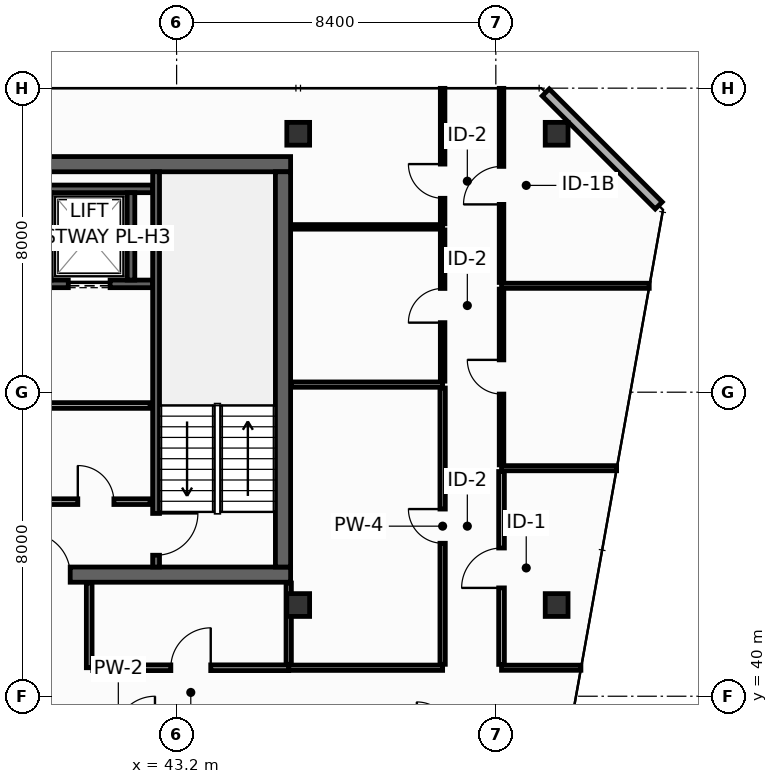
"""IFC4 building model, lengths in metres.
Left out: names, types, materials, properties, quantities, classifications, styles, units other than length and angle.
Written with IfcOpenShell. Run it as: python <this file> out.ifc"""

import sys

from ifc_helpers import new_model, si_unit, direction, frame, frame_2d, origin, origin_2d, place, context, subcontext, project, spatial, rectangle, hollow_rectangle, extrude, element, fill, save


model = new_model("IFC4")
c1 = context("Model", 3, precision=1e-05, world=origin(), true_north=direction((0.0, 1.0)))
c2 = subcontext(c1, "Body", "Model", "MODEL_VIEW")
j1 = project(units=[si_unit("LENGTHUNIT", "METRE"), si_unit("PLANEANGLEUNIT", "RADIAN")], contexts=[c1])
p1 = place(None, origin())
s1 = spatial("IfcSite", under=j1, at=p1, CompositionType="ELEMENT")
p2 = place(p1, origin())
s2 = spatial("IfcBuilding", under=s1, at=p2, CompositionType="ELEMENT")
p3 = place(p2, frame((0.0, 0.0, 264.8)))
s3 = spatial("IfcBuildingStorey", under=s2, at=p3, CompositionType="ELEMENT", Elevation=264.8)
p4 = place(p3, frame((13.7, 43.2, 0.0), z_axis=(0.0, 0.0, 1.0), x_axis=(1.0, 0.0, 0.0)))
e1 = element("IfcWall", 1, at=p4, inside=s3, PredefinedType="SHEAR", context=c2, shape_type="SweptSolid", body=[
    extrude(rectangle(XDim=32.5, YDim=0.4, at=frame_2d((16.25, 0.0))), origin(), (0.0, 0.0, 1.0), 3.55),
])
p5 = place(p4, frame((5.4, 0.0, 0.0)))
e2 = element("IfcOpeningElement", 2, at=p5, cuts=e1, PredefinedType="OPENING", context=c2, shape_type="SweptSolid", body=[
    extrude(rectangle(XDim=1.1, YDim=2.15, at=frame_2d((0.55, 1.075))), frame((0.0, 0.21, 0.0), z_axis=(0.0, -1.0, 0.0), x_axis=(1.0, 0.0, 0.0)), (0.0, 0.0, 1.0), 0.42),
])
p6 = place(p4, frame((25.6, 0.0, 0.0)))
e3 = element("IfcOpeningElement", 3, at=p6, cuts=e1, PredefinedType="OPENING", context=c2, shape_type="SweptSolid", body=[
    extrude(rectangle(XDim=1.1, YDim=2.15, at=frame_2d((0.55, 1.075))), frame((0.0, 0.21, 0.0), z_axis=(0.0, -1.0, 0.0), x_axis=(1.0, 0.0, 0.0)), (0.0, 0.0, 1.0), 0.42),
])
p7 = place(p3, frame((13.7, 54.0, 0.0), z_axis=(0.0, 0.0, 1.0), x_axis=(1.0, 0.0, 0.0)))
e4 = element("IfcWall", 4, at=p7, inside=s3, PredefinedType="SHEAR", context=c2, shape_type="SweptSolid", body=[
    extrude(rectangle(XDim=32.5, YDim=0.4, at=frame_2d((16.25, 0.0))), origin(), (0.0, 0.0, 1.0), 3.55),
])
p8 = place(p3, frame((46.0, 43.4, 0.0), z_axis=(0.0, 0.0, 1.0), x_axis=(0.0, 1.0, 0.0)))
e5 = element("IfcWall", 5, at=p8, inside=s3, PredefinedType="SHEAR", context=c2, shape_type="SweptSolid", body=[
    extrude(rectangle(XDim=10.4, YDim=0.4, at=frame_2d((5.2, 0.0))), origin(), (0.0, 0.0, 1.0), 3.55),
])
for number, where, z_axis, x_axis in (
    (6, (46.4, 54.8, 0.0), (0.0, 0.0, 1.0), (1.0, 0.0, 0.0)),
    (7, (53.2, 54.8, 0.0), (0.0, 0.0, 1.0), (1.0, 0.0, 0.0)),
    (8, (46.4, 42.4, 0.0), (0.0, 0.0, 1.0), (1.0, 0.0, 0.0)),
    (9, (53.2, 42.4, 0.0), (0.0, 0.0, 1.0), (1.0, 0.0, 0.0)),
):
    element("IfcColumn", number, at=place(p3, frame(where, z_axis=z_axis, x_axis=x_axis)), inside=s3, PredefinedType="COLUMN", context=c2, shape_type="SweptSolid", body=[
        extrude(hollow_rectangle(XDim=0.6, YDim=0.6, WallThickness=0.028, at=origin_2d()), origin(), (0.0, 0.0, 1.0), 3.8),
    ])
p9 = place(p3, frame((39.525, 50.85, 0.0), z_axis=(0.0, 0.0, 1.0), x_axis=(1.0, 0.0, 0.0)))
e10 = element("IfcWall", 10, at=p9, inside=s3, PredefinedType="SHEAR", context=c2, shape_type="SweptSolid", body=[
    extrude(rectangle(XDim=3.045, YDim=0.2, at=frame_2d((1.522, 0.0))), origin(), (0.0, 0.0, 1.0), 3.55),
])
p10 = place(p9, frame((0.825, 0.0, 0.0)))
e11 = element("IfcOpeningElement", 11, at=p10, cuts=e10, PredefinedType="OPENING", context=c2, shape_type="SweptSolid", body=[
    extrude(rectangle(XDim=1.1, YDim=2.2, at=frame_2d((0.55, 1.1))), frame((0.0, 0.11, 0.0), z_axis=(0.0, -1.0, 0.0), x_axis=(1.0, 0.0, 0.0)), (0.0, 0.0, 1.0), 0.22),
])
p11 = place(p3, frame((39.525, 53.35, 0.0), z_axis=(0.0, 0.0, 1.0), x_axis=(1.0, 0.0, 0.0)))
e12 = element("IfcWall", 12, at=p11, inside=s3, PredefinedType="SHEAR", context=c2, shape_type="SweptSolid", body=[
    extrude(rectangle(XDim=3.045, YDim=0.2, at=frame_2d((1.522, 0.0))), origin(), (0.0, 0.0, 1.0), 3.55),
])
p12 = place(p3, frame((42.0, 50.95, 0.0), z_axis=(0.0, 0.0, 1.0), x_axis=(0.0, 1.0, 0.0)))
e13 = element("IfcWall", 13, at=p12, inside=s3, PredefinedType="SHEAR", context=c2, shape_type="SweptSolid", body=[
    extrude(rectangle(XDim=2.3, YDim=0.2, at=frame_2d((1.15, 0.0))), origin(), (0.0, 0.0, 1.0), 3.55),
])
p13 = place(p3, frame((42.66, 53.8, 0.0), z_axis=(0.0, 0.0, 1.0), x_axis=(0.0, -1.0, 0.0)))
e14 = element("IfcWall", 14, at=p13, inside=s3, PredefinedType="SHEAR", context=c2, shape_type="SweptSolid", body=[
    extrude(rectangle(XDim=10.4, YDim=0.18, at=frame_2d((5.2, 0.0))), origin(), (0.0, 0.0, 1.0), 3.55),
])
p14 = place(p13, frame((8.99, 0.0, 0.0)))
e15 = element("IfcOpeningElement", 15, at=p14, cuts=e14, PredefinedType="OPENING", context=c2, shape_type="SweptSolid", body=[
    extrude(rectangle(XDim=1.1, YDim=2.15, at=frame_2d((0.55, 1.075))), frame((0.0, 0.1, 0.0), z_axis=(0.0, -1.0, 0.0), x_axis=(1.0, 0.0, 0.0)), (0.0, 0.0, 1.0), 0.2),
])
p15 = place(p3, frame((33.95, 45.12, 0.0), z_axis=(0.0, 0.0, 1.0), x_axis=(1.0, 0.0, 0.0)))
e16 = element("IfcWall", 16, at=p15, inside=s3, PredefinedType="PARTITIONING", context=c2, shape_type="SweptSolid", body=[
    extrude(rectangle(XDim=8.55, YDim=0.15, at=frame_2d((4.275, 0.0))), origin(), (0.0, 0.0, 1.0), 3.55),
])
p16 = place(p15, frame((0.95, 0.0, 0.0)))
e17 = element("IfcOpeningElement", 17, at=p16, cuts=e16, PredefinedType="OPENING", context=c2, shape_type="SweptSolid", body=[
    extrude(rectangle(XDim=0.95, YDim=2.15, at=frame_2d((0.475, 1.075))), frame((0.0, 0.085, 0.0), z_axis=(0.0, -1.0, 0.0), x_axis=(1.0, 0.0, 0.0)), (0.0, 0.0, 1.0), 0.17),
])
p17 = place(p15, frame((3.8, 0.0, 0.0)))
e18 = element("IfcOpeningElement", 18, at=p17, cuts=e16, PredefinedType="OPENING", context=c2, shape_type="SweptSolid", body=[
    extrude(rectangle(XDim=0.95, YDim=2.15, at=frame_2d((0.475, 1.075))), frame((0.0, 0.085, 0.0), z_axis=(0.0, -1.0, 0.0), x_axis=(1.0, 0.0, 0.0)), (0.0, 0.0, 1.0), 0.17),
])
p18 = place(p15, frame((6.65, 0.0, 0.0)))
e19 = element("IfcOpeningElement", 19, at=p18, cuts=e16, PredefinedType="OPENING", context=c2, shape_type="SweptSolid", body=[
    extrude(rectangle(XDim=0.95, YDim=2.15, at=frame_2d((0.475, 1.075))), frame((0.0, 0.085, 0.0), z_axis=(0.0, -1.0, 0.0), x_axis=(1.0, 0.0, 0.0)), (0.0, 0.0, 1.0), 0.17),
])
p19 = place(p3, frame((33.95, 47.65, 0.0), z_axis=(0.0, 0.0, 1.0), x_axis=(1.0, 0.0, 0.0)))
e20 = element("IfcWall", 20, at=p19, inside=s3, PredefinedType="PARTITIONING", context=c2, shape_type="SweptSolid", body=[
    extrude(rectangle(XDim=8.55, YDim=0.15, at=frame_2d((4.275, 0.0))), origin(), (0.0, 0.0, 1.0), 3.55),
])
p20 = place(p3, frame((55.887, 52.913, 0.0), z_axis=(0.0, 0.0, 1.0), x_axis=(-0.707106781187, 0.707106781187, 0.0)))
e21 = element("IfcWall", 21, at=p20, inside=s3, PredefinedType="STANDARD", context=c2, shape_type="SweptSolid", body=[
    extrude(rectangle(XDim=4.206, YDim=0.26, at=frame_2d((2.103, 0.0))), origin(), (0.0, 0.0, 1.0), 3.55),
])
p21 = place(p3, frame((46.15, 40.75, 0.0), z_axis=(0.0, 0.0, 1.0), x_axis=(1.0, 0.0, 0.0)))
e22 = element("IfcWall", 22, at=p21, inside=s3, PredefinedType="PARTITIONING", context=c2, shape_type="SweptSolid", body=[
    extrude(rectangle(XDim=4.05, YDim=0.14, at=frame_2d((2.025, 0.0))), origin(), (0.0, 0.0, 1.0), 3.55),
])
p22 = place(p3, frame((46.15, 40.84, 0.0), z_axis=(0.0, 0.0, 1.0), x_axis=(0.0, 1.0, 0.0)))
e23 = element("IfcWall", 23, at=p22, inside=s3, PredefinedType="PARTITIONING", context=c2, shape_type="SweptSolid", body=[
    extrude(rectangle(XDim=2.14, YDim=0.14, at=frame_2d((1.07, 0.0))), origin(), (0.0, 0.0, 1.0), 3.55),
])
p23 = place(p3, frame((46.22, 48.2, 0.0), z_axis=(0.0, 0.0, 1.0), x_axis=(1.0, 0.0, 0.0)))
e24 = element("IfcWall", 24, at=p23, inside=s3, PredefinedType="PARTITIONING", context=c2, shape_type="SweptSolid", body=[
    extrude(rectangle(XDim=3.98, YDim=0.14, at=frame_2d((1.99, 0.0))), origin(), (0.0, 0.0, 1.0), 3.55),
])
p24 = place(p3, frame((50.2, 40.84, 0.0), z_axis=(0.0, 0.0, 1.0), x_axis=(0.0, 1.0, 0.0)))
e25 = element("IfcWall", 25, at=p24, inside=s3, PredefinedType="PARTITIONING", context=c2, shape_type="SweptSolid", body=[
    extrude(rectangle(XDim=7.27, YDim=0.14, at=frame_2d((3.635, 0.0))), origin(), (0.0, 0.0, 1.0), 2.947),
])
p25 = place(p24, frame((3.185, 0.0, 0.0)))
e26 = element("IfcOpeningElement", 26, at=p25, cuts=e25, PredefinedType="OPENING", context=c2, shape_type="SweptSolid", body=[
    extrude(rectangle(XDim=0.9, YDim=2.1, at=frame_2d((0.45, 1.05))), frame((0.0, 0.08, 0.0), z_axis=(0.0, -1.0, 0.0), x_axis=(1.0, 0.0, 0.0)), (0.0, 0.0, 1.0), 0.16),
])
p26 = place(p3, frame((46.22, 52.35, 0.0), z_axis=(0.0, 0.0, 1.0), x_axis=(1.0, 0.0, 0.0)))
e27 = element("IfcWall", 27, at=p26, inside=s3, PredefinedType="PARTITIONING", context=c2, shape_type="SweptSolid", body=[
    extrude(rectangle(XDim=3.98, YDim=0.12, at=frame_2d((1.99, 0.0))), origin(), (0.0, 0.0, 1.0), 3.55),
])
p27 = place(p3, frame((50.2, 48.29, 0.0), z_axis=(0.0, 0.0, 1.0), x_axis=(0.0, 1.0, 0.0)))
e28 = element("IfcWall", 28, at=p27, inside=s3, PredefinedType="PARTITIONING", context=c2, shape_type="SweptSolid", body=[
    extrude(rectangle(XDim=3.98, YDim=0.12, at=frame_2d((1.99, 0.0))), origin(), (0.0, 0.0, 1.0), 3.55),
])
p28 = place(p27, frame((1.54, 0.0, 0.0)))
e29 = element("IfcOpeningElement", 29, at=p28, cuts=e28, PredefinedType="OPENING", context=c2, shape_type="SweptSolid", body=[
    extrude(rectangle(XDim=0.9, YDim=2.1, at=frame_2d((0.45, 1.05))), frame((0.0, 0.07, 0.0), z_axis=(0.0, -1.0, 0.0), x_axis=(1.0, 0.0, 0.0)), (0.0, 0.0, 1.0), 0.14),
])
p29 = place(p3, frame((50.2, 52.43, 0.0), z_axis=(0.0, 0.0, 1.0), x_axis=(0.0, 1.0, 0.0)))
e30 = element("IfcWall", 30, at=p29, inside=s3, PredefinedType="PARTITIONING", context=c2, shape_type="SweptSolid", body=[
    extrude(rectangle(XDim=3.565, YDim=0.12, at=frame_2d((1.783, 0.0))), origin(), (0.0, 0.0, 1.0), 2.935),
])
p30 = place(p29, frame((0.672, 0.0, 0.0)))
e31 = element("IfcOpeningElement", 31, at=p30, cuts=e30, PredefinedType="OPENING", context=c2, shape_type="SweptSolid", body=[
    extrude(rectangle(XDim=0.9, YDim=2.1, at=frame_2d((0.45, 1.05))), frame((0.0, 0.07, 0.0), z_axis=(0.0, -1.0, 0.0), x_axis=(1.0, 0.0, 0.0)), (0.0, 0.0, 1.0), 0.14),
])
p31 = place(p3, frame((51.75, 40.75, 0.0), z_axis=(0.0, 0.0, 1.0), x_axis=(1.0, 0.0, 0.0)))
e32 = element("IfcWall", 32, at=p31, inside=s3, PredefinedType="PARTITIONING", context=c2, shape_type="SweptSolid", body=[
    extrude(rectangle(XDim=2.089, YDim=0.135, at=frame_2d((1.044, 0.0))), origin(), (0.0, 0.0, 1.0), 3.085),
])
p32 = place(p3, frame((51.75, 46.0, 0.0), z_axis=(0.0, 0.0, 1.0), x_axis=(1.0, 0.0, 0.0)))
e33 = element("IfcWall", 33, at=p32, inside=s3, PredefinedType="PARTITIONING", context=c2, shape_type="SweptSolid", body=[
    extrude(rectangle(XDim=3.028, YDim=0.135, at=frame_2d((1.514, 0.0))), origin(), (0.0, 0.0, 1.0), 2.947),
])
p33 = place(p3, frame((51.75, 50.8, 0.0), z_axis=(0.0, 0.0, 1.0), x_axis=(1.0, 0.0, 0.0)))
e34 = element("IfcWall", 34, at=p33, inside=s3, PredefinedType="PARTITIONING", context=c2, shape_type="SweptSolid", body=[
    extrude(rectangle(XDim=3.887, YDim=0.135, at=frame_2d((1.943, 0.0))), origin(), (0.0, 0.0, 1.0), 2.947),
])
p34 = place(p3, frame((51.75, 40.837, 0.0), z_axis=(0.0, 0.0, 1.0), x_axis=(0.0, 1.0, 0.0)))
e35 = element("IfcWall", 35, at=p34, inside=s3, PredefinedType="PARTITIONING", context=c2, shape_type="SweptSolid", body=[
    extrude(rectangle(XDim=5.075, YDim=0.15, at=frame_2d((2.538, 0.0))), origin(), (0.0, 0.0, 1.0), 2.947),
])
p35 = place(p34, frame((2.013, 0.0, 0.0)))
e36 = element("IfcOpeningElement", 36, at=p35, cuts=e35, PredefinedType="OPENING", context=c2, shape_type="SweptSolid", body=[
    extrude(rectangle(XDim=1.05, YDim=2.15, at=frame_2d((0.525, 1.075))), frame((0.0, 0.085, 0.0), z_axis=(0.0, -1.0, 0.0), x_axis=(1.0, 0.0, 0.0)), (0.0, 0.0, 1.0), 0.17),
])
p36 = place(p3, frame((51.75, 46.087, 0.0), z_axis=(0.0, 0.0, 1.0), x_axis=(0.0, 1.0, 0.0)))
e37 = element("IfcWall", 37, at=p36, inside=s3, PredefinedType="PARTITIONING", context=c2, shape_type="SweptSolid", body=[
    extrude(rectangle(XDim=4.625, YDim=0.12, at=frame_2d((2.312, 0.0))), origin(), (0.0, 0.0, 1.0), 3.55),
])
p37 = place(p36, frame((1.863, 0.0, 0.0)))
e38 = element("IfcOpeningElement", 38, at=p37, cuts=e37, PredefinedType="OPENING", context=c2, shape_type="SweptSolid", body=[
    extrude(rectangle(XDim=0.9, YDim=2.1, at=frame_2d((0.45, 1.05))), frame((0.0, 0.07, 0.0), z_axis=(0.0, -1.0, 0.0), x_axis=(1.0, 0.0, 0.0)), (0.0, 0.0, 1.0), 0.14),
])
p38 = place(p3, frame((51.75, 50.887, 0.0), z_axis=(0.0, 0.0, 1.0), x_axis=(0.0, 1.0, 0.0)))
e39 = element("IfcWall", 39, at=p38, inside=s3, PredefinedType="PARTITIONING", context=c2, shape_type="SweptSolid", body=[
    extrude(rectangle(XDim=5.108, YDim=0.12, at=frame_2d((2.554, 0.0))), origin(), (0.0, 0.0, 1.0), 2.935),
])
p39 = place(p38, frame((2.054, 0.0, 0.0)))
e40 = element("IfcOpeningElement", 40, at=p39, cuts=e39, PredefinedType="OPENING", context=c2, shape_type="SweptSolid", body=[
    extrude(rectangle(XDim=1.0, YDim=2.15, at=frame_2d((0.5, 1.075))), frame((0.0, 0.07, 0.0), z_axis=(0.0, -1.0, 0.0), x_axis=(1.0, 0.0, 0.0)), (0.0, 0.0, 1.0), 0.14),
])
p40 = place(p3, frame((40.9, 40.75, 0.0), z_axis=(0.0, 0.0, 1.0), x_axis=(0.0, 1.0, 0.0)))
e41 = element("IfcWall", 41, at=p40, inside=s3, PredefinedType="PARTITIONING", context=c2, shape_type="SweptSolid", body=[
    extrude(rectangle(XDim=2.23, YDim=0.15, at=frame_2d((1.115, 0.0))), origin(), (0.0, 0.0, 1.0), 3.55),
])
p41 = place(p3, frame((40.995, 40.75, 0.0), z_axis=(0.0, 0.0, 1.0), x_axis=(1.0, 0.0, 0.0)))
e42 = element("IfcWall", 42, at=p41, inside=s3, PredefinedType="PARTITIONING", context=c2, shape_type="SweptSolid", body=[
    extrude(rectangle(XDim=5.155, YDim=0.15, at=frame_2d((2.577, 0.0))), origin(), (0.0, 0.0, 1.0), 3.55),
])
p42 = place(p41, frame((2.053, 0.0, 0.0)))
e43 = element("IfcOpeningElement", 43, at=p42, cuts=e42, PredefinedType="OPENING", context=c2, shape_type="SweptSolid", body=[
    extrude(rectangle(XDim=1.05, YDim=2.15, at=frame_2d((0.525, 1.075))), frame((0.0, 0.085, 0.0), z_axis=(0.0, -1.0, 0.0), x_axis=(1.0, 0.0, 0.0)), (0.0, 0.0, 1.0), 0.17),
])
p43 = place(p10, origin())
e44 = element("IfcDoor", 44, at=p43, inside=s3, OperationType="SLIDING_TO_LEFT", PredefinedType="DOOR", context=c2, shape_type="SweptSolid", body=[
    extrude(rectangle(XDim=1.1, YDim=2.2, at=frame_2d((0.55, 1.1))), frame((0.0, 0.025, 0.0), z_axis=(0.0, -1.0, 0.0), x_axis=(1.0, 0.0, 0.0)), (0.0, 0.0, 1.0), 0.05),
])
fill(e11, e44)
p44 = place(p14, origin())
e45 = element("IfcDoor", 45, at=p44, inside=s3, OperationType="SINGLE_SWING_LEFT", PredefinedType="DOOR", context=c2, shape_type="SweptSolid", body=[
    extrude(rectangle(XDim=1.1, YDim=2.15, at=frame_2d((0.55, 1.075))), frame((0.0, 0.025, 0.0), z_axis=(0.0, -1.0, 0.0), x_axis=(1.0, 0.0, 0.0)), (0.0, 0.0, 1.0), 0.05),
])
fill(e15, e45)
p45 = place(p6, origin())
e46 = element("IfcDoor", 46, at=p45, inside=s3, OperationType="SINGLE_SWING_LEFT", PredefinedType="DOOR", context=c2, shape_type="SweptSolid", body=[
    extrude(rectangle(XDim=1.1, YDim=2.15, at=frame_2d((0.55, 1.075))), frame((0.0, 0.025, 0.0), z_axis=(0.0, -1.0, 0.0), x_axis=(1.0, 0.0, 0.0)), (0.0, 0.0, 1.0), 0.05),
])
fill(e3, e46)
p46 = place(p18, origin())
e47 = element("IfcDoor", 47, at=p46, inside=s3, OperationType="SINGLE_SWING_LEFT", PredefinedType="DOOR", context=c2, shape_type="SweptSolid", body=[
    extrude(rectangle(XDim=0.95, YDim=2.15, at=frame_2d((0.475, 1.075))), frame((0.0, 0.025, 0.0), z_axis=(0.0, -1.0, 0.0), x_axis=(1.0, 0.0, 0.0)), (0.0, 0.0, 1.0), 0.05),
])
fill(e19, e47)
p47 = place(p25, origin())
e48 = element("IfcDoor", 48, at=p47, inside=s3, OperationType="SINGLE_SWING_RIGHT", PredefinedType="DOOR", context=c2, shape_type="SweptSolid", body=[
    extrude(rectangle(XDim=0.9, YDim=2.1, at=frame_2d((0.45, 1.05))), frame((0.0, 0.025, 0.0), z_axis=(0.0, -1.0, 0.0), x_axis=(1.0, 0.0, 0.0)), (0.0, 0.0, 1.0), 0.05),
])
fill(e26, e48)
p48 = place(p28, origin())
e49 = element("IfcDoor", 49, at=p48, inside=s3, OperationType="SINGLE_SWING_LEFT", PredefinedType="DOOR", context=c2, shape_type="SweptSolid", body=[
    extrude(rectangle(XDim=0.9, YDim=2.1, at=frame_2d((0.45, 1.05))), frame((0.0, 0.025, 0.0), z_axis=(0.0, -1.0, 0.0), x_axis=(1.0, 0.0, 0.0)), (0.0, 0.0, 1.0), 0.05),
])
fill(e29, e49)
p49 = place(p30, origin())
e50 = element("IfcDoor", 50, at=p49, inside=s3, OperationType="SINGLE_SWING_RIGHT", PredefinedType="DOOR", context=c2, shape_type="SweptSolid", body=[
    extrude(rectangle(XDim=0.9, YDim=2.1, at=frame_2d((0.45, 1.05))), frame((0.0, 0.025, 0.0), z_axis=(0.0, -1.0, 0.0), x_axis=(1.0, 0.0, 0.0)), (0.0, 0.0, 1.0), 0.05),
])
fill(e31, e50)
p50 = place(p35, origin())
e51 = element("IfcDoor", 51, at=p50, inside=s3, OperationType="SINGLE_SWING_LEFT", PredefinedType="DOOR", context=c2, shape_type="SweptSolid", body=[
    extrude(rectangle(XDim=1.05, YDim=2.15, at=frame_2d((0.525, 1.075))), frame((0.0, 0.025, 0.0), z_axis=(0.0, -1.0, 0.0), x_axis=(1.0, 0.0, 0.0)), (0.0, 0.0, 1.0), 0.05),
])
fill(e36, e51)
p51 = place(p37, origin())
e52 = element("IfcDoor", 52, at=p51, inside=s3, OperationType="SINGLE_SWING_RIGHT", PredefinedType="DOOR", context=c2, shape_type="SweptSolid", body=[
    extrude(rectangle(XDim=0.9, YDim=2.1, at=frame_2d((0.45, 1.05))), frame((0.0, 0.025, 0.0), z_axis=(0.0, -1.0, 0.0), x_axis=(1.0, 0.0, 0.0)), (0.0, 0.0, 1.0), 0.05),
])
fill(e38, e52)
p52 = place(p39, origin())
e53 = element("IfcDoor", 53, at=p52, inside=s3, OperationType="SINGLE_SWING_LEFT", PredefinedType="DOOR", context=c2, shape_type="SweptSolid", body=[
    extrude(rectangle(XDim=1.0, YDim=2.15, at=frame_2d((0.5, 1.075))), frame((0.0, 0.025, 0.0), z_axis=(0.0, -1.0, 0.0), x_axis=(1.0, 0.0, 0.0)), (0.0, 0.0, 1.0), 0.05),
])
fill(e40, e53)
p53 = place(p42, origin())
e54 = element("IfcDoor", 54, at=p53, inside=s3, OperationType="SINGLE_SWING_RIGHT", PredefinedType="DOOR", context=c2, shape_type="SweptSolid", body=[
    extrude(rectangle(XDim=1.05, YDim=2.15, at=frame_2d((0.525, 1.075))), frame((0.0, 0.025, 0.0), z_axis=(0.0, -1.0, 0.0), x_axis=(1.0, 0.0, 0.0)), (0.0, 0.0, 1.0), 0.05),
])
fill(e43, e54)
save(model, sys.argv[1])
